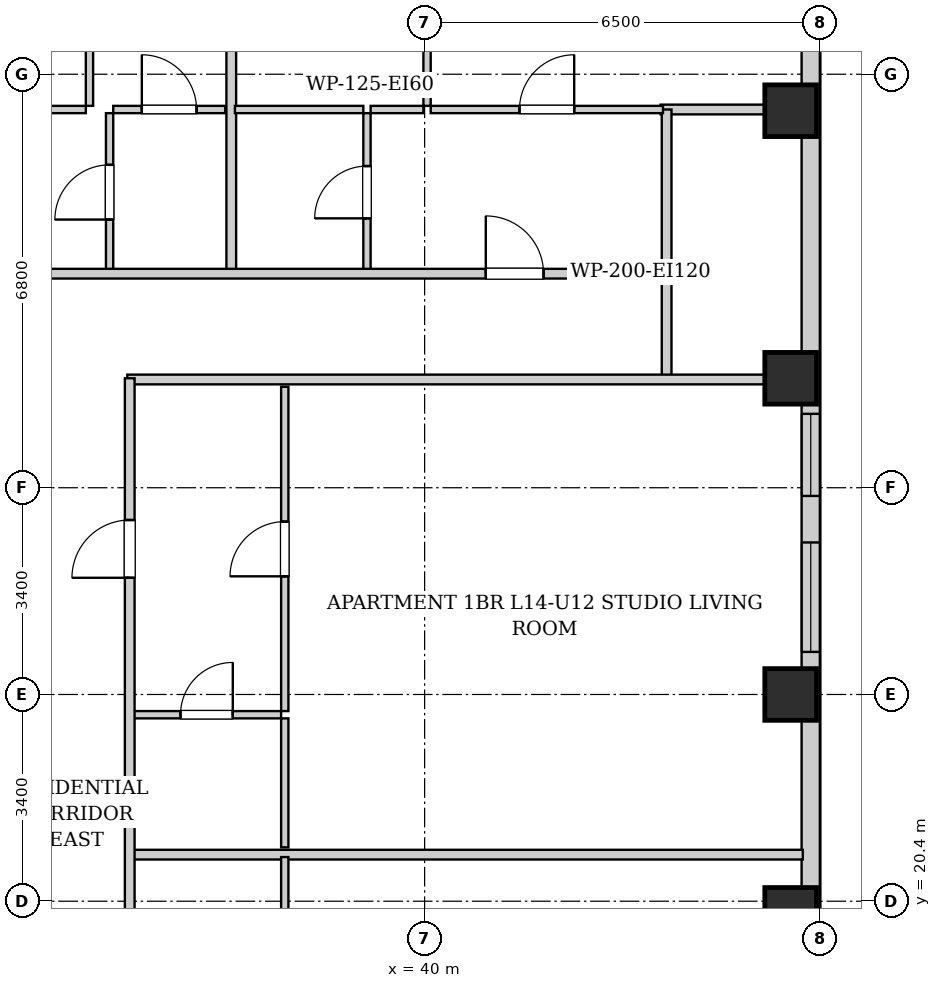
"""IFC4 building model, lengths in metres.
Left out: names, types, materials, properties, quantities, classifications, styles, units other than length and angle.
Written with IfcOpenShell. Run it as: python <this file> out.ifc"""

import sys

from ifc_helpers import new_model, si_unit, direction, frame, frame_2d, origin, origin_2d, place, context, subcontext, project, spatial, rectangle, extrude, element, fill, save


model = new_model("IFC4")
c1 = context("Model", 3, precision=1e-05, world=origin(), true_north=direction((0.0, 1.0)))
c2 = subcontext(c1, "Body", "Model", "MODEL_VIEW")
j1 = project(units=[si_unit("LENGTHUNIT", "METRE"), si_unit("PLANEANGLEUNIT", "RADIAN")], contexts=[c1])
p1 = place(None, origin())
s1 = spatial("IfcSite", under=j1, at=p1, CompositionType="ELEMENT")
p2 = place(p1, origin())
s2 = spatial("IfcBuilding", under=s1, at=p2, CompositionType="ELEMENT")
p3 = place(p2, frame((0.0, 0.0, 54.6)))
s3 = spatial("IfcBuildingStorey", under=s2, at=p3, CompositionType="ELEMENT", Elevation=54.6)
for number, where, z_axis, x_axis in (
    (1, (46.02, 20.2, 0.0), (0.0, 0.0, 1.0), (1.0, 0.0, 0.0)),
    (2, (46.02, 23.8, 0.0), (0.0, 0.0, 1.0), (1.0, 0.0, 0.0)),
    (3, (46.02, 29.0, 0.0), (0.0, 0.0, 1.0), (1.0, 0.0, 0.0)),
    (4, (46.02, 33.4, 0.0), (0.0, 0.0, 1.0), (1.0, 0.0, 0.0)),
):
    element("IfcColumn", number, at=place(p3, frame(where, z_axis=z_axis, x_axis=x_axis)), inside=s3, PredefinedType="COLUMN", context=c2, shape_type="SweptSolid", body=[
        extrude(rectangle(XDim=0.85, YDim=0.85, at=origin_2d()), origin(), (0.0, 0.0, 1.0), 3.2),
    ])
p4 = place(p3, frame((46.35, 45.1, 0.0), z_axis=(0.0, 0.0, 1.0), x_axis=(0.0, -1.0, 0.0)))
e5 = element("IfcWall", 5, at=p4, inside=s3, PredefinedType="SOLIDWALL", context=c2, shape_type="SweptSolid", body=[
    extrude(rectangle(XDim=42.6, YDim=0.3, at=frame_2d((21.3, 0.0))), origin(), (0.0, 0.0, 1.0), 1.975),
])
p5 = place(p4, frame((37.575, 0.0, 0.55)))
e6 = element("IfcOpeningElement", 6, at=p5, cuts=e5, PredefinedType="OPENING", context=c2, shape_type="SweptSolid", body=[
    extrude(rectangle(XDim=1.8, YDim=1.2, at=frame_2d((0.9, 0.6))), frame((0.0, 0.16, 0.0), z_axis=(0.0, -1.0, 0.0), x_axis=(1.0, 0.0, 0.0)), (0.0, 0.0, 1.0), 0.32),
])
p6 = place(p4, frame((34.85, 0.0, 0.55)))
e7 = element("IfcOpeningElement", 7, at=p6, cuts=e5, PredefinedType="OPENING", context=c2, shape_type="SweptSolid", body=[
    extrude(rectangle(XDim=1.35, YDim=1.2, at=frame_2d((0.675, 0.6))), frame((0.0, 0.16, 0.0), z_axis=(0.0, -1.0, 0.0), x_axis=(1.0, 0.0, 0.0)), (0.0, 0.0, 1.0), 0.32),
])
p7 = place(p4, frame((3.715, 0.0, 0.55)))
e8 = element("IfcOpeningElement", 8, at=p7, cuts=e5, PredefinedType="OPENING", context=c2, shape_type="SweptSolid", body=[
    extrude(rectangle(XDim=1.8, YDim=1.2, at=frame_2d((0.9, 0.6))), frame((0.0, 0.16, 0.0), z_axis=(0.0, -1.0, 0.0), x_axis=(1.0, 0.0, 0.0)), (0.0, 0.0, 1.0), 0.32),
])
p8 = place(p4, frame((1.185, 0.0, 0.55)))
e9 = element("IfcOpeningElement", 9, at=p8, cuts=e5, PredefinedType="OPENING", context=c2, shape_type="SweptSolid", body=[
    extrude(rectangle(XDim=1.35, YDim=1.2, at=frame_2d((0.675, 0.6))), frame((0.0, 0.16, 0.0), z_axis=(0.0, -1.0, 0.0), x_axis=(1.0, 0.0, 0.0)), (0.0, 0.0, 1.0), 0.32),
])
p9 = place(p4, frame((26.025, 0.0, 0.55)))
e10 = element("IfcOpeningElement", 10, at=p9, cuts=e5, PredefinedType="OPENING", context=c2, shape_type="SweptSolid", body=[
    extrude(rectangle(XDim=1.8, YDim=1.2, at=frame_2d((0.9, 0.6))), frame((0.0, 0.16, 0.0), z_axis=(0.0, -1.0, 0.0), x_axis=(1.0, 0.0, 0.0)), (0.0, 0.0, 1.0), 0.32),
])
p10 = place(p4, frame((28.085, 0.0, 0.55)))
e11 = element("IfcOpeningElement", 11, at=p10, cuts=e5, PredefinedType="OPENING", context=c2, shape_type="SweptSolid", body=[
    extrude(rectangle(XDim=1.35, YDim=1.2, at=frame_2d((0.675, 0.6))), frame((0.0, 0.16, 0.0), z_axis=(0.0, -1.0, 0.0), x_axis=(1.0, 0.0, 0.0)), (0.0, 0.0, 1.0), 0.32),
])
p11 = place(p4, frame((18.8, 0.0, 0.55)))
e12 = element("IfcOpeningElement", 12, at=p11, cuts=e5, PredefinedType="OPENING", context=c2, shape_type="SweptSolid", body=[
    extrude(rectangle(XDim=1.8, YDim=1.2, at=frame_2d((0.9, 0.6))), frame((0.0, 0.16, 0.0), z_axis=(0.0, -1.0, 0.0), x_axis=(1.0, 0.0, 0.0)), (0.0, 0.0, 1.0), 0.32),
])
p12 = place(p4, frame((16.685, 0.0, 0.55)))
e13 = element("IfcOpeningElement", 13, at=p12, cuts=e5, PredefinedType="OPENING", context=c2, shape_type="SweptSolid", body=[
    extrude(rectangle(XDim=1.35, YDim=1.2, at=frame_2d((0.675, 0.6))), frame((0.0, 0.16, 0.0), z_axis=(0.0, -1.0, 0.0), x_axis=(1.0, 0.0, 0.0)), (0.0, 0.0, 1.0), 0.32),
])
p13 = place(p3, frame((43.98, 28.98, 0.0), z_axis=(0.0, 0.0, 1.0), x_axis=(0.0, 1.0, 0.0)))
e14 = element("IfcWall", 14, at=p13, inside=s3, PredefinedType="PARTITIONING", context=c2, shape_type="SweptSolid", body=[
    extrude(rectangle(XDim=1.74, YDim=0.16, at=frame_2d((0.87, 0.0))), origin(), (0.0, 0.0, 1.0), 2.94),
])
p14 = place(p3, frame((35.11, 28.98, 0.0), z_axis=(0.0, 0.0, 1.0), x_axis=(1.0, 0.0, 0.0)))
e15 = element("IfcWall", 15, at=p14, inside=s3, PredefinedType="PARTITIONING", context=c2, shape_type="SweptSolid", body=[
    extrude(rectangle(XDim=11.11, YDim=0.16, at=frame_2d((5.555, 0.0))), origin(), (0.0, 0.0, 1.0), 2.232),
])
p15 = place(p3, frame((34.819, 30.76, 0.0), z_axis=(0.0, 0.0, 1.0), x_axis=(0.0, 1.0, 0.0)))
e16 = element("IfcWall", 16, at=p15, inside=s3, PredefinedType="PARTITIONING", context=c2, shape_type="SweptSolid", body=[
    extrude(rectangle(XDim=2.6, YDim=0.12, at=frame_2d((1.3, 0.0))), origin(), (0.0, 0.0, 1.0), 2.94),
])
p16 = place(p15, frame((0.85, 0.0, 0.0)))
e17 = element("IfcOpeningElement", 17, at=p16, cuts=e16, PredefinedType="OPENING", context=c2, shape_type="SweptSolid", body=[
    extrude(rectangle(XDim=0.9, YDim=2.05, at=frame_2d((0.45, 1.025))), frame((0.0, 0.07, 0.0), z_axis=(0.0, -1.0, 0.0), x_axis=(1.0, 0.0, 0.0)), (0.0, 0.0, 1.0), 0.14),
])
p17 = place(p3, frame((31.676, 33.42, 0.0), z_axis=(0.0, 0.0, 1.0), x_axis=(1.0, 0.0, 0.0)))
e18 = element("IfcWall", 18, at=p17, inside=s3, PredefinedType="PARTITIONING", context=c2, shape_type="SweptSolid", body=[
    extrude(rectangle(XDim=2.752, YDim=0.12, at=frame_2d((1.376, 0.0))), origin(), (0.0, 0.0, 1.0), 2.94),
])
p18 = place(p17, frame((0.926, 0.0, 0.0)))
e19 = element("IfcOpeningElement", 19, at=p18, cuts=e18, PredefinedType="OPENING", context=c2, shape_type="SweptSolid", body=[
    extrude(rectangle(XDim=0.9, YDim=2.05, at=frame_2d((0.45, 1.025))), frame((0.0, 0.07, 0.0), z_axis=(0.0, -1.0, 0.0), x_axis=(1.0, 0.0, 0.0)), (0.0, 0.0, 1.0), 0.14),
])
p19 = place(p3, frame((34.879, 33.42, 0.0), z_axis=(0.0, 0.0, 1.0), x_axis=(1.0, 0.0, 0.0)))
e20 = element("IfcWall", 20, at=p19, inside=s3, PredefinedType="PARTITIONING", context=c2, shape_type="SweptSolid", body=[
    extrude(rectangle(XDim=1.841, YDim=0.12, at=frame_2d((0.92, 0.0))), origin(), (0.0, 0.0, 1.0), 2.94),
])
p20 = place(p19, frame((0.47, 0.0, 0.0)))
e21 = element("IfcOpeningElement", 21, at=p20, cuts=e20, PredefinedType="OPENING", context=c2, shape_type="SweptSolid", body=[
    extrude(rectangle(XDim=0.9, YDim=2.05, at=frame_2d((0.45, 1.025))), frame((0.0, 0.07, 0.0), z_axis=(0.0, -1.0, 0.0), x_axis=(1.0, 0.0, 0.0)), (0.0, 0.0, 1.0), 0.14),
])
p21 = place(p3, frame((34.488, 33.48, 0.0), z_axis=(0.0, 0.0, 1.0), x_axis=(0.0, 1.0, 0.0)))
e22 = element("IfcWall", 22, at=p21, inside=s3, PredefinedType="PARTITIONING", context=c2, shape_type="SweptSolid", body=[
    extrude(rectangle(XDim=13.84, YDim=0.12, at=frame_2d((6.92, 0.0))), origin(), (0.0, 0.0, 1.0), 2.94),
])
p22 = place(p21, frame((6.455, 0.0, 0.0)))
e23 = element("IfcOpeningElement", 23, at=p22, cuts=e22, PredefinedType="OPENING", context=c2, shape_type="SweptSolid", body=[
    extrude(rectangle(XDim=0.9, YDim=2.05, at=frame_2d((0.45, 1.025))), frame((0.0, 0.07, 0.0), z_axis=(0.0, -1.0, 0.0), x_axis=(1.0, 0.0, 0.0)), (0.0, 0.0, 1.0), 0.14),
])
p23 = place(p3, frame((43.88, 33.42, 0.0), z_axis=(0.0, 0.0, 1.0), x_axis=(1.0, 0.0, 0.0)))
e24 = element("IfcWall", 24, at=p23, inside=s3, PredefinedType="PARTITIONING", context=c2, shape_type="SweptSolid", body=[
    extrude(rectangle(XDim=2.34, YDim=0.16, at=frame_2d((1.17, 0.0))), origin(), (0.0, 0.0, 1.0), 2.94),
])
p24 = place(p3, frame((43.98, 30.76, 0.0), z_axis=(0.0, 0.0, 1.0), x_axis=(0.0, 1.0, 0.0)))
e25 = element("IfcWall", 25, at=p24, inside=s3, PredefinedType="PARTITIONING", context=c2, shape_type="SweptSolid", body=[
    extrude(rectangle(XDim=2.66, YDim=0.16, at=frame_2d((1.33, 0.0))), origin(), (0.0, 0.0, 1.0), 2.94),
])
p25 = place(p3, frame((36.82, 30.76, 0.0), z_axis=(0.0, 0.0, 1.0), x_axis=(0.0, 1.0, 0.0)))
e26 = element("IfcWall", 26, at=p25, inside=s3, PredefinedType="PARTITIONING", context=c2, shape_type="SweptSolid", body=[
    extrude(rectangle(XDim=16.56, YDim=0.16, at=frame_2d((8.28, 0.0))), origin(), (0.0, 0.0, 1.0), 2.94),
])
p26 = place(p3, frame((39.052, 30.76, 0.0), z_axis=(0.0, 0.0, 1.0), x_axis=(0.0, 1.0, 0.0)))
e27 = element("IfcWall", 27, at=p26, inside=s3, PredefinedType="PARTITIONING", context=c2, shape_type="SweptSolid", body=[
    extrude(rectangle(XDim=2.6, YDim=0.12, at=frame_2d((1.3, 0.0))), origin(), (0.0, 0.0, 1.0), 2.94),
])
p27 = place(p26, frame((0.87, 0.0, 0.0)))
e28 = element("IfcOpeningElement", 28, at=p27, cuts=e27, PredefinedType="OPENING", context=c2, shape_type="SweptSolid", body=[
    extrude(rectangle(XDim=0.86, YDim=2.05, at=frame_2d((0.43, 1.025))), frame((0.0, 0.07, 0.0), z_axis=(0.0, -1.0, 0.0), x_axis=(1.0, 0.0, 0.0)), (0.0, 0.0, 1.0), 0.14),
])
p28 = place(p3, frame((36.88, 33.42, 0.0), z_axis=(0.0, 0.0, 1.0), x_axis=(1.0, 0.0, 0.0)))
e29 = element("IfcWall", 29, at=p28, inside=s3, PredefinedType="PARTITIONING", context=c2, shape_type="SweptSolid", body=[
    extrude(rectangle(XDim=2.112, YDim=0.12, at=frame_2d((1.056, 0.0))), origin(), (0.0, 0.0, 1.0), 2.94),
])
p29 = place(p3, frame((39.112, 33.42, 0.0), z_axis=(0.0, 0.0, 1.0), x_axis=(1.0, 0.0, 0.0)))
e30 = element("IfcWall", 30, at=p29, inside=s3, PredefinedType="PARTITIONING", context=c2, shape_type="SweptSolid", body=[
    extrude(rectangle(XDim=0.868, YDim=0.12, at=frame_2d((0.434, 0.0))), origin(), (0.0, 0.0, 1.0), 2.94),
])
p30 = place(p3, frame((40.1, 33.42, 0.0), z_axis=(0.0, 0.0, 1.0), x_axis=(1.0, 0.0, 0.0)))
e31 = element("IfcWall", 31, at=p30, inside=s3, PredefinedType="PARTITIONING", context=c2, shape_type="SweptSolid", body=[
    extrude(rectangle(XDim=3.82, YDim=0.12, at=frame_2d((1.91, 0.0))), origin(), (0.0, 0.0, 1.0), 2.94),
])
p31 = place(p30, frame((1.46, 0.0, 0.0)))
e32 = element("IfcOpeningElement", 32, at=p31, cuts=e31, PredefinedType="OPENING", context=c2, shape_type="SweptSolid", body=[
    extrude(rectangle(XDim=0.9, YDim=2.05, at=frame_2d((0.45, 1.025))), frame((0.0, 0.07, 0.0), z_axis=(0.0, -1.0, 0.0), x_axis=(1.0, 0.0, 0.0)), (0.0, 0.0, 1.0), 0.14),
])
p32 = place(p3, frame((40.04, 33.48, 0.0), z_axis=(0.0, 0.0, 1.0), x_axis=(0.0, 1.0, 0.0)))
e33 = element("IfcWall", 33, at=p32, inside=s3, PredefinedType="PARTITIONING", context=c2, shape_type="SweptSolid", body=[
    extrude(rectangle(XDim=11.69, YDim=0.12, at=frame_2d((5.845, 0.0))), origin(), (0.0, 0.0, 1.0), 2.94),
])
p33 = place(p32, frame((5.395, 0.0, 0.0)))
e34 = element("IfcOpeningElement", 34, at=p33, cuts=e33, PredefinedType="OPENING", context=c2, shape_type="SweptSolid", body=[
    extrude(rectangle(XDim=0.9, YDim=2.05, at=frame_2d((0.45, 1.025))), frame((0.0, 0.07, 0.0), z_axis=(0.0, -1.0, 0.0), x_axis=(1.0, 0.0, 0.0)), (0.0, 0.0, 1.0), 0.14),
])
p34 = place(p3, frame((35.19, 21.166, 0.0), z_axis=(0.0, 0.0, 1.0), x_axis=(1.0, 0.0, 0.0)))
e35 = element("IfcWall", 35, at=p34, inside=s3, PredefinedType="PARTITIONING", context=c2, shape_type="SweptSolid", body=[
    extrude(rectangle(XDim=11.03, YDim=0.16, at=frame_2d((5.515, 0.0))), origin(), (0.0, 0.0, 1.0), 2.94),
])
p35 = place(p3, frame((37.7, 17.18, 0.0), z_axis=(0.0, 0.0, 1.0), x_axis=(0.0, 1.0, 0.0)))
e36 = element("IfcWall", 36, at=p35, inside=s3, PredefinedType="PARTITIONING", context=c2, shape_type="SweptSolid", body=[
    extrude(rectangle(XDim=3.946, YDim=0.12, at=frame_2d((1.973, 0.0))), origin(), (0.0, 0.0, 1.0), 2.94),
])
p36 = place(p35, frame((1.523, 0.0, 0.0)))
e37 = element("IfcOpeningElement", 37, at=p36, cuts=e36, PredefinedType="OPENING", context=c2, shape_type="SweptSolid", body=[
    extrude(rectangle(XDim=0.9, YDim=2.05, at=frame_2d((0.45, 1.025))), frame((0.0, 0.07, 0.0), z_axis=(0.0, -1.0, 0.0), x_axis=(1.0, 0.0, 0.0)), (0.0, 0.0, 1.0), 0.14),
])
p37 = place(p3, frame((35.19, 23.467, 0.0), z_axis=(0.0, 0.0, 1.0), x_axis=(1.0, 0.0, 0.0)))
e38 = element("IfcWall", 38, at=p37, inside=s3, PredefinedType="PARTITIONING", context=c2, shape_type="SweptSolid", body=[
    extrude(rectangle(XDim=2.45, YDim=0.12, at=frame_2d((1.225, 0.0))), origin(), (0.0, 0.0, 1.0), 2.94),
])
p38 = place(p37, frame((0.795, 0.0, 0.0)))
e39 = element("IfcOpeningElement", 39, at=p38, cuts=e38, PredefinedType="OPENING", context=c2, shape_type="SweptSolid", body=[
    extrude(rectangle(XDim=0.86, YDim=2.05, at=frame_2d((0.43, 1.025))), frame((0.0, 0.07, 0.0), z_axis=(0.0, -1.0, 0.0), x_axis=(1.0, 0.0, 0.0)), (0.0, 0.0, 1.0), 0.14),
])
p39 = place(p3, frame((37.7, 21.286, 0.0), z_axis=(0.0, 0.0, 1.0), x_axis=(0.0, 1.0, 0.0)))
e40 = element("IfcWall", 40, at=p39, inside=s3, PredefinedType="PARTITIONING", context=c2, shape_type="SweptSolid", body=[
    extrude(rectangle(XDim=2.121, YDim=0.12, at=frame_2d((1.061, 0.0))), origin(), (0.0, 0.0, 1.0), 2.94),
])
p40 = place(p3, frame((37.7, 23.527, 0.0), z_axis=(0.0, 0.0, 1.0), x_axis=(0.0, 1.0, 0.0)))
e41 = element("IfcWall", 41, at=p40, inside=s3, PredefinedType="PARTITIONING", context=c2, shape_type="SweptSolid", body=[
    extrude(rectangle(XDim=5.333, YDim=0.12, at=frame_2d((2.667, 0.0))), origin(), (0.0, 0.0, 1.0), 2.94),
])
p41 = place(p40, frame((2.216, 0.0, 0.0)))
e42 = element("IfcOpeningElement", 42, at=p41, cuts=e41, PredefinedType="OPENING", context=c2, shape_type="SweptSolid", body=[
    extrude(rectangle(XDim=0.9, YDim=2.05, at=frame_2d((0.45, 1.025))), frame((0.0, 0.07, 0.0), z_axis=(0.0, -1.0, 0.0), x_axis=(1.0, 0.0, 0.0)), (0.0, 0.0, 1.0), 0.14),
])
p42 = place(p3, frame((10.05, 30.72, 0.0), z_axis=(0.0, 0.0, 1.0), x_axis=(1.0, 0.0, 0.0)))
e43 = element("IfcWall", 43, at=p42, inside=s3, PredefinedType="PARTITIONING", context=c2, shape_type="SweptSolid", body=[
    extrude(rectangle(XDim=33.9, YDim=0.16, at=frame_2d((16.95, 0.0))), origin(), (0.0, 0.0, 1.0), 2.94),
])
p43 = place(p42, frame((3.8, 0.0, 0.0)))
e44 = element("IfcOpeningElement", 44, at=p43, cuts=e43, PredefinedType="OPENING", context=c2, shape_type="SweptSolid", body=[
    extrude(rectangle(XDim=0.95, YDim=2.1, at=frame_2d((0.475, 1.05))), frame((0.0, 0.09, 0.0), z_axis=(0.0, -1.0, 0.0), x_axis=(1.0, 0.0, 0.0)), (0.0, 0.0, 1.0), 0.18),
])
p44 = place(p42, frame((11.977, 0.0, 0.0)))
e45 = element("IfcOpeningElement", 45, at=p44, cuts=e43, PredefinedType="OPENING", context=c2, shape_type="SweptSolid", body=[
    extrude(rectangle(XDim=0.95, YDim=2.1, at=frame_2d((0.475, 1.05))), frame((0.0, 0.09, 0.0), z_axis=(0.0, -1.0, 0.0), x_axis=(1.0, 0.0, 0.0)), (0.0, 0.0, 1.0), 0.18),
])
p45 = place(p42, frame((18.09, 0.0, 0.0)))
e46 = element("IfcOpeningElement", 46, at=p45, cuts=e43, PredefinedType="OPENING", context=c2, shape_type="SweptSolid", body=[
    extrude(rectangle(XDim=0.95, YDim=2.1, at=frame_2d((0.475, 1.05))), frame((0.0, 0.09, 0.0), z_axis=(0.0, -1.0, 0.0), x_axis=(1.0, 0.0, 0.0)), (0.0, 0.0, 1.0), 0.18),
])
p46 = place(p42, frame((30.956, 0.0, 0.0)))
e47 = element("IfcOpeningElement", 47, at=p46, cuts=e43, PredefinedType="OPENING", context=c2, shape_type="SweptSolid", body=[
    extrude(rectangle(XDim=0.95, YDim=2.1, at=frame_2d((0.475, 1.05))), frame((0.0, 0.09, 0.0), z_axis=(0.0, -1.0, 0.0), x_axis=(1.0, 0.0, 0.0)), (0.0, 0.0, 1.0), 0.18),
])
p47 = place(p3, frame((35.15, 15.07, 0.0), z_axis=(0.0, 0.0, 1.0), x_axis=(0.0, 1.0, 0.0)))
e48 = element("IfcWall", 48, at=p47, inside=s3, PredefinedType="PARTITIONING", context=c2, shape_type="SweptSolid", body=[
    extrude(rectangle(XDim=13.93, YDim=0.16, at=frame_2d((6.965, 0.0))), origin(), (0.0, 0.0, 1.0), 2.94),
])
p48 = place(p47, frame((3.608, 0.0, 0.0)))
e49 = element("IfcOpeningElement", 49, at=p48, cuts=e48, PredefinedType="OPENING", context=c2, shape_type="SweptSolid", body=[
    extrude(rectangle(XDim=0.95, YDim=2.1, at=frame_2d((0.475, 1.05))), frame((0.0, 0.09, 0.0), z_axis=(0.0, -1.0, 0.0), x_axis=(1.0, 0.0, 0.0)), (0.0, 0.0, 1.0), 0.18),
])
p49 = place(p47, frame((10.649, 0.0, 0.0)))
e50 = element("IfcOpeningElement", 50, at=p49, cuts=e48, PredefinedType="OPENING", context=c2, shape_type="SweptSolid", body=[
    extrude(rectangle(XDim=0.95, YDim=2.1, at=frame_2d((0.475, 1.05))), frame((0.0, 0.09, 0.0), z_axis=(0.0, -1.0, 0.0), x_axis=(1.0, 0.0, 0.0)), (0.0, 0.0, 1.0), 0.18),
])
p50 = place(p16, origin())
e51 = element("IfcDoor", 51, at=p50, inside=s3, OperationType="SINGLE_SWING_LEFT", PredefinedType="DOOR", context=c2, shape_type="SweptSolid", body=[
    extrude(rectangle(XDim=0.9, YDim=2.05, at=frame_2d((0.45, 1.025))), frame((0.0, 0.025, 0.0), z_axis=(0.0, -1.0, 0.0), x_axis=(1.0, 0.0, 0.0)), (0.0, 0.0, 1.0), 0.05),
])
fill(e17, e51)
p51 = place(p20, origin())
e52 = element("IfcDoor", 52, at=p51, inside=s3, OperationType="SINGLE_SWING_LEFT", PredefinedType="DOOR", context=c2, shape_type="SweptSolid", body=[
    extrude(rectangle(XDim=0.9, YDim=2.05, at=frame_2d((0.45, 1.025))), frame((0.0, 0.025, 0.0), z_axis=(0.0, -1.0, 0.0), x_axis=(1.0, 0.0, 0.0)), (0.0, 0.0, 1.0), 0.05),
])
fill(e21, e52)
p52 = place(p27, origin())
e53 = element("IfcDoor", 53, at=p52, inside=s3, OperationType="SINGLE_SWING_LEFT", PredefinedType="DOOR", context=c2, shape_type="SweptSolid", body=[
    extrude(rectangle(XDim=0.86, YDim=2.05, at=frame_2d((0.43, 1.025))), frame((0.0, 0.025, 0.0), z_axis=(0.0, -1.0, 0.0), x_axis=(1.0, 0.0, 0.0)), (0.0, 0.0, 1.0), 0.05),
])
fill(e28, e53)
p53 = place(p31, origin())
e54 = element("IfcDoor", 54, at=p53, inside=s3, OperationType="SINGLE_SWING_RIGHT", PredefinedType="DOOR", context=c2, shape_type="SweptSolid", body=[
    extrude(rectangle(XDim=0.9, YDim=2.05, at=frame_2d((0.45, 1.025))), frame((0.0, 0.025, 0.0), z_axis=(0.0, -1.0, 0.0), x_axis=(1.0, 0.0, 0.0)), (0.0, 0.0, 1.0), 0.05),
])
fill(e32, e54)
p54 = place(p38, origin())
e55 = element("IfcDoor", 55, at=p54, inside=s3, OperationType="SINGLE_SWING_RIGHT", PredefinedType="DOOR", context=c2, shape_type="SweptSolid", body=[
    extrude(rectangle(XDim=0.86, YDim=2.05, at=frame_2d((0.43, 1.025))), frame((0.0, 0.025, 0.0), z_axis=(0.0, -1.0, 0.0), x_axis=(1.0, 0.0, 0.0)), (0.0, 0.0, 1.0), 0.05),
])
fill(e39, e55)
p55 = place(p41, origin())
e56 = element("IfcDoor", 56, at=p55, inside=s3, OperationType="SINGLE_SWING_LEFT", PredefinedType="DOOR", context=c2, shape_type="SweptSolid", body=[
    extrude(rectangle(XDim=0.9, YDim=2.05, at=frame_2d((0.45, 1.025))), frame((0.0, 0.025, 0.0), z_axis=(0.0, -1.0, 0.0), x_axis=(1.0, 0.0, 0.0)), (0.0, 0.0, 1.0), 0.05),
])
fill(e42, e56)
p56 = place(p46, origin())
e57 = element("IfcDoor", 57, at=p56, inside=s3, OperationType="SINGLE_SWING_LEFT", PredefinedType="DOOR", context=c2, shape_type="SweptSolid", body=[
    extrude(rectangle(XDim=0.95, YDim=2.1, at=frame_2d((0.475, 1.05))), frame((0.0, 0.025, 0.0), z_axis=(0.0, -1.0, 0.0), x_axis=(1.0, 0.0, 0.0)), (0.0, 0.0, 1.0), 0.05),
])
fill(e47, e57)
p57 = place(p49, origin())
e58 = element("IfcDoor", 58, at=p57, inside=s3, OperationType="SINGLE_SWING_LEFT", PredefinedType="DOOR", context=c2, shape_type="SweptSolid", body=[
    extrude(rectangle(XDim=0.95, YDim=2.1, at=frame_2d((0.475, 1.05))), frame((0.0, 0.025, 0.0), z_axis=(0.0, -1.0, 0.0), x_axis=(1.0, 0.0, 0.0)), (0.0, 0.0, 1.0), 0.05),
])
fill(e50, e58)
p58 = place(p11, origin())
e59 = element("IfcWindow", 59, at=p58, inside=s3, PartitioningType="DOUBLE_PANEL_VERTICAL", PredefinedType="WINDOW", context=c2, shape_type="SweptSolid", body=[
    extrude(rectangle(XDim=1.8, YDim=1.2, at=frame_2d((0.9, 0.6))), frame((0.0, 0.03, 0.0), z_axis=(0.0, -1.0, 0.0), x_axis=(1.0, 0.0, 0.0)), (0.0, 0.0, 1.0), 0.06),
])
fill(e12, e59)
p59 = place(p12, origin())
e60 = element("IfcWindow", 60, at=p59, inside=s3, PartitioningType="SINGLE_PANEL", PredefinedType="WINDOW", context=c2, shape_type="SweptSolid", body=[
    extrude(rectangle(XDim=1.35, YDim=1.2, at=frame_2d((0.675, 0.6))), frame((0.0, 0.03, 0.0), z_axis=(0.0, -1.0, 0.0), x_axis=(1.0, 0.0, 0.0)), (0.0, 0.0, 1.0), 0.06),
])
fill(e13, e60)
save(model, sys.argv[1])
